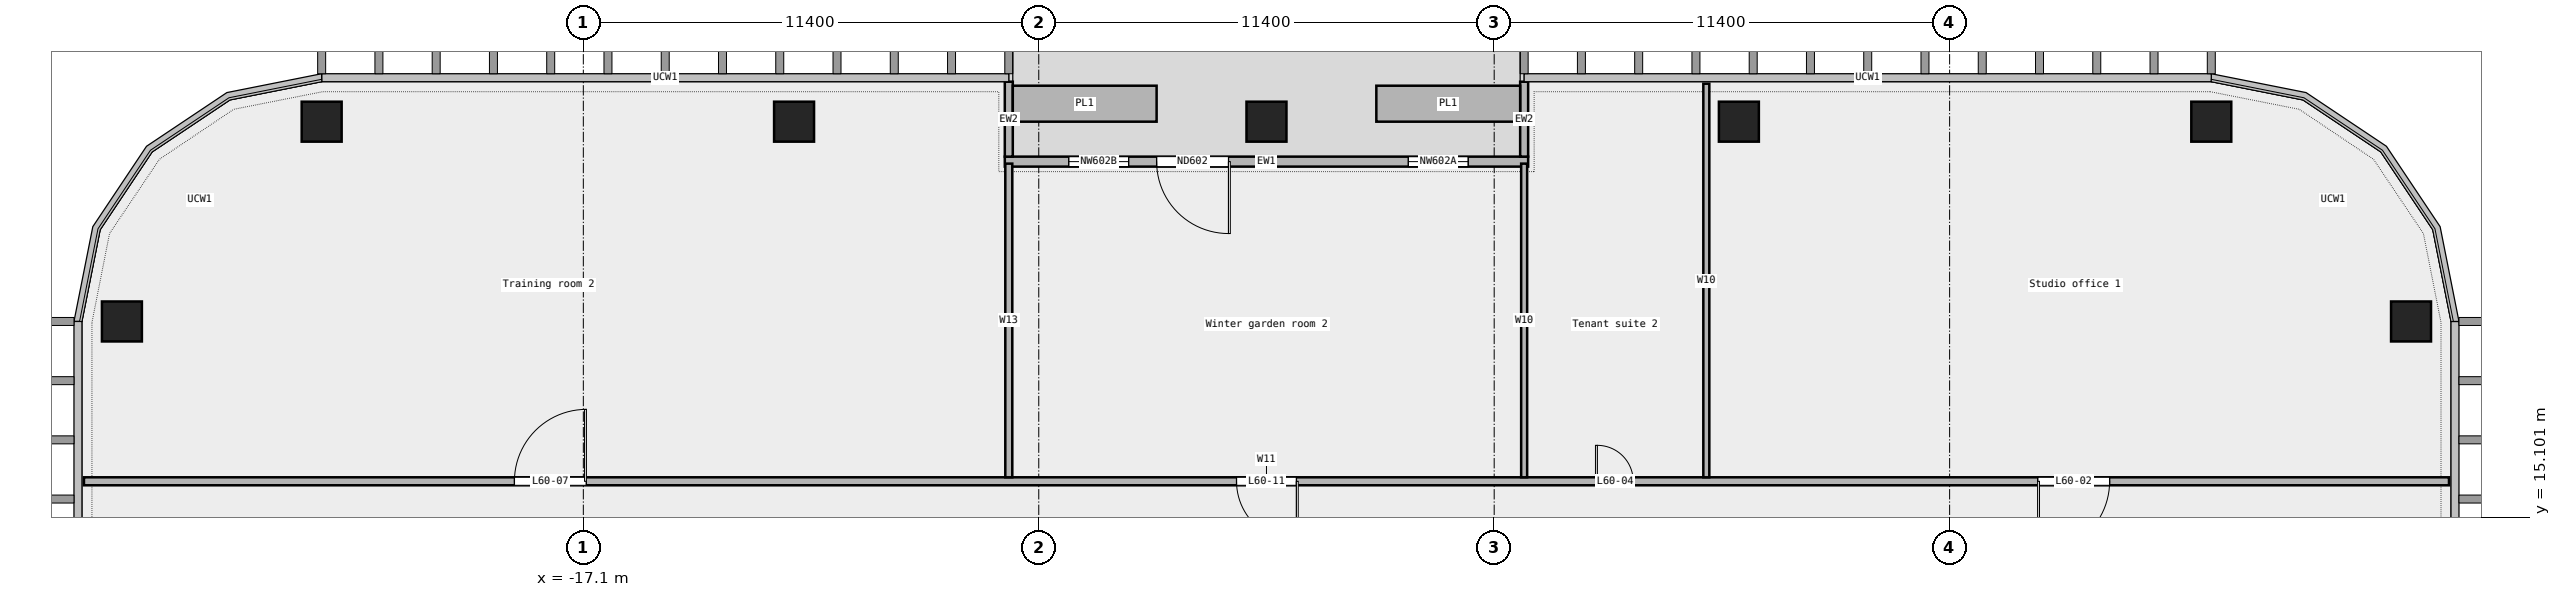
"""IFC4 building model, lengths in metres.
Left out: names, types, materials, properties, quantities, classifications, styles, units other than length and angle.
Written with IfcOpenShell. Run it as: python <this file> out.ifc"""

import sys

from ifc_helpers import new_model, si_unit, direction, frame, frame_2d, origin, origin_2d, place, context, subcontext, project, spatial, rectangle, extrude, element, fill, save


model = new_model("IFC4")
c1 = context("Model", 3, precision=1e-05, world=origin(), true_north=direction((0.0, 1.0)))
c2 = subcontext(c1, "Body", "Model", "MODEL_VIEW")
j1 = project(units=[si_unit("LENGTHUNIT", "METRE"), si_unit("PLANEANGLEUNIT", "RADIAN")], contexts=[c1])
p1 = place(None, origin())
s1 = spatial("IfcSite", under=j1, at=p1, CompositionType="ELEMENT")
p2 = place(p1, origin())
s2 = spatial("IfcBuilding", under=s1, at=p2, CompositionType="ELEMENT")
p3 = place(p2, frame((0.0, 0.0, 279.4)))
s3 = spatial("IfcBuildingStorey", under=s2, at=p3, CompositionType="ELEMENT", Elevation=279.4)
for number, where, z_axis, x_axis in (
    (1, (28.65, 20.0, 0.0), (0.0, 0.0, 1.0), (1.0, 0.0, 0.0)),
    (2, (23.65, 25.0, 0.0), (0.0, 0.0, 1.0), (1.0, 0.0, 0.0)),
    (3, (11.825, 25.0, 0.0), (0.0, 0.0, 1.0), (1.0, 0.0, 0.0)),
    (4, (0.0, 25.0, 0.0), (0.0, 0.0, 1.0), (1.0, 0.0, 0.0)),
    (5, (-11.825, 25.0, 0.0), (0.0, 0.0, 1.0), (1.0, 0.0, 0.0)),
    (6, (-23.65, 25.0, 0.0), (0.0, 0.0, 1.0), (1.0, 0.0, 0.0)),
    (7, (-28.65, 20.0, 0.0), (0.0, 0.0, 1.0), (1.0, 0.0, 0.0)),
):
    element("IfcColumn", number, at=place(p3, frame(where, z_axis=z_axis, x_axis=x_axis)), inside=s3, PredefinedType="COLUMN", context=c2, shape_type="SweptSolid", body=[
        extrude(rectangle(XDim=1.0, YDim=1.0, at=origin_2d()), origin(), (0.0, 0.0, 1.0), 3.6),
    ])
p4 = place(p3, frame((6.55, 24.0, 0.0), z_axis=(0.0, 0.0, 1.0), x_axis=(-1.0, 0.0, 0.0)))
e8 = element("IfcWall", 8, at=p4, inside=s3, PredefinedType="STANDARD", context=c2, shape_type="SweptSolid", body=[
    extrude(rectangle(XDim=13.1, YDim=0.25, at=frame_2d((6.55, 0.0))), origin(), (0.0, 0.0, 1.0), 3.6),
])
p5 = place(p4, frame((1.5, 0.0, 0.45)))
e9 = element("IfcOpeningElement", 9, at=p5, cuts=e8, PredefinedType="OPENING", context=c2, shape_type="SweptSolid", body=[
    extrude(rectangle(XDim=1.5, YDim=2.4, at=frame_2d((0.75, 1.2))), frame((0.0, 0.137, 0.0), z_axis=(0.0, -1.0, 0.0), x_axis=(1.0, 0.0, 0.0)), (0.0, 0.0, 1.0), 0.274),
])
p6 = place(p4, frame((7.5, 0.0, 0.0)))
e10 = element("IfcOpeningElement", 10, at=p6, cuts=e8, PredefinedType="OPENING", context=c2, shape_type="SweptSolid", body=[
    extrude(rectangle(XDim=1.8, YDim=2.4, at=frame_2d((0.9, 1.2))), frame((0.0, 0.137, 0.0), z_axis=(0.0, -1.0, 0.0), x_axis=(1.0, 0.0, 0.0)), (0.0, 0.0, 1.0), 0.274),
])
p7 = place(p4, frame((10.0, 0.0, 0.45)))
e11 = element("IfcOpeningElement", 11, at=p7, cuts=e8, PredefinedType="OPENING", context=c2, shape_type="SweptSolid", body=[
    extrude(rectangle(XDim=1.5, YDim=2.4, at=frame_2d((0.75, 1.2))), frame((0.0, 0.137, 0.0), z_axis=(0.0, -1.0, 0.0), x_axis=(1.0, 0.0, 0.0)), (0.0, 0.0, 1.0), 0.274),
])
for number, where, z_axis, x_axis in (
    (12, (6.45, 26.0, 0.0), (0.0, 0.0, 1.0), (0.0, -1.0, 0.0)),
    (13, (-6.45, 26.0, 0.0), (0.0, 0.0, 1.0), (0.0, -1.0, 0.0)),
):
    element("IfcWall", number, at=place(p3, frame(where, z_axis=z_axis, x_axis=x_axis)), inside=s3, PredefinedType="STANDARD", context=c2, shape_type="SweptSolid", body=[
        extrude(rectangle(XDim=1.875, YDim=0.2, at=frame_2d((0.938, 0.0))), origin(), (0.0, 0.0, 1.0), 3.6),
    ])
for number, where, z_axis, x_axis in (
    (14, (6.35, 25.45, 0.0), (0.0, 0.0, 1.0), (-1.0, 0.0, 0.0)),
    (15, (-2.75, 25.45, 0.0), (0.0, 0.0, 1.0), (-1.0, 0.0, 0.0)),
):
    element("IfcWall", number, at=place(p3, frame(where, z_axis=z_axis, x_axis=x_axis)), inside=s3, PredefinedType="STANDARD", context=c2, shape_type="SweptSolid", body=[
        extrude(rectangle(XDim=3.6, YDim=0.9, at=frame_2d((1.8, 0.0))), origin(), (0.0, 0.0, 1.0), 0.7),
    ])
p8 = place(p3, frame((-29.6, 16.0, 0.0), z_axis=(0.0, 0.0, 1.0), x_axis=(1.0, 0.0, 0.0)))
e16 = element("IfcWall", 16, at=p8, inside=s3, PredefinedType="PARTITIONING", context=c2, shape_type="SweptSolid", body=[
    extrude(rectangle(XDim=59.2, YDim=0.2, at=frame_2d((29.6, 0.0))), origin(), (0.0, 0.0, 1.0), 3.6),
])
p9 = place(p8, frame((48.905, 0.0, 0.0)))
e17 = element("IfcOpeningElement", 17, at=p9, cuts=e16, PredefinedType="OPENING", context=c2, shape_type="SweptSolid", body=[
    extrude(rectangle(XDim=1.8, YDim=2.1, at=frame_2d((0.9, 1.05))), frame((0.0, 0.112, 0.0), z_axis=(0.0, -1.0, 0.0), x_axis=(1.0, 0.0, 0.0)), (0.0, 0.0, 1.0), 0.224),
])
p10 = place(p8, frame((37.88, 0.0, 0.0)))
e18 = element("IfcOpeningElement", 18, at=p10, cuts=e16, PredefinedType="OPENING", context=c2, shape_type="SweptSolid", body=[
    extrude(rectangle(XDim=0.9, YDim=2.1, at=frame_2d((0.45, 1.05))), frame((0.0, 0.112, 0.0), z_axis=(0.0, -1.0, 0.0), x_axis=(1.0, 0.0, 0.0)), (0.0, 0.0, 1.0), 0.224),
])
p11 = place(p8, frame((10.775, 0.0, 0.0)))
e19 = element("IfcOpeningElement", 19, at=p11, cuts=e16, PredefinedType="OPENING", context=c2, shape_type="SweptSolid", body=[
    extrude(rectangle(XDim=1.8, YDim=2.1, at=frame_2d((0.9, 1.05))), frame((0.0, 0.112, 0.0), z_axis=(0.0, -1.0, 0.0), x_axis=(1.0, 0.0, 0.0)), (0.0, 0.0, 1.0), 0.224),
])
p12 = place(p8, frame((28.85, 0.0, 0.0)))
e20 = element("IfcOpeningElement", 20, at=p12, cuts=e16, PredefinedType="OPENING", context=c2, shape_type="SweptSolid", body=[
    extrude(rectangle(XDim=1.5, YDim=2.1, at=frame_2d((0.75, 1.05))), frame((0.0, 0.112, 0.0), z_axis=(0.0, -1.0, 0.0), x_axis=(1.0, 0.0, 0.0)), (0.0, 0.0, 1.0), 0.224),
])
p13 = place(p3, frame((-6.45, 16.1, 0.0), z_axis=(0.0, 0.0, 1.0), x_axis=(0.0, 1.0, 0.0)))
e21 = element("IfcWall", 21, at=p13, inside=s3, PredefinedType="PARTITIONING", context=c2, shape_type="SweptSolid", body=[
    extrude(rectangle(XDim=7.85, YDim=0.175, at=frame_2d((3.925, 0.0))), origin(), (0.0, 0.0, 1.0), 3.6),
])
p14 = place(p3, frame((6.45, 16.1, 0.0), z_axis=(0.0, 0.0, 1.0), x_axis=(0.0, 1.0, 0.0)))
e22 = element("IfcWall", 22, at=p14, inside=s3, PredefinedType="PARTITIONING", context=c2, shape_type="SweptSolid", body=[
    extrude(rectangle(XDim=7.85, YDim=0.15, at=frame_2d((3.925, 0.0))), origin(), (0.0, 0.0, 1.0), 3.6),
])
p15 = place(p3, frame((11.01, 16.1, 0.0), z_axis=(0.0, 0.0, 1.0), x_axis=(0.0, 1.0, 0.0)))
e23 = element("IfcWall", 23, at=p15, inside=s3, PredefinedType="PARTITIONING", context=c2, shape_type="SweptSolid", body=[
    extrude(rectangle(XDim=9.85, YDim=0.15, at=frame_2d((4.925, 0.0))), origin(), (0.0, 0.0, 1.0), 3.6),
])
p16 = place(p5, origin())
e24 = element("IfcWindow", 24, at=p16, inside=s3, PartitioningType="SINGLE_PANEL", PredefinedType="WINDOW", context=c2, shape_type="SweptSolid", body=[
    extrude(rectangle(XDim=1.5, YDim=2.4, at=frame_2d((0.75, 1.2))), frame((0.0, 0.03, 0.0), z_axis=(0.0, -1.0, 0.0), x_axis=(1.0, 0.0, 0.0)), (0.0, 0.0, 1.0), 0.06),
])
fill(e9, e24)
p17 = place(p6, origin())
e25 = element("IfcDoor", 25, at=p17, inside=s3, OperationType="DOUBLE_DOOR_SINGLE_SWING", PredefinedType="DOOR", context=c2, shape_type="SweptSolid", body=[
    extrude(rectangle(XDim=1.8, YDim=2.4, at=frame_2d((0.9, 1.2))), frame((0.0, 0.025, 0.0), z_axis=(0.0, -1.0, 0.0), x_axis=(1.0, 0.0, 0.0)), (0.0, 0.0, 1.0), 0.05),
])
fill(e10, e25)
p18 = place(p7, origin())
e26 = element("IfcWindow", 26, at=p18, inside=s3, PartitioningType="SINGLE_PANEL", PredefinedType="WINDOW", context=c2, shape_type="SweptSolid", body=[
    extrude(rectangle(XDim=1.5, YDim=2.4, at=frame_2d((0.75, 1.2))), frame((0.0, 0.03, 0.0), z_axis=(0.0, -1.0, 0.0), x_axis=(1.0, 0.0, 0.0)), (0.0, 0.0, 1.0), 0.06),
])
fill(e11, e26)
p19 = place(p9, origin())
e27 = element("IfcDoor", 27, at=p19, inside=s3, OperationType="DOUBLE_DOOR_SINGLE_SWING", PredefinedType="DOOR", context=c2, shape_type="SweptSolid", body=[
    extrude(rectangle(XDim=1.8, YDim=2.1, at=frame_2d((0.9, 1.05))), frame((0.0, 0.025, 0.0), z_axis=(0.0, -1.0, 0.0), x_axis=(1.0, 0.0, 0.0)), (0.0, 0.0, 1.0), 0.05),
])
fill(e17, e27)
p20 = place(p10, origin())
e28 = element("IfcDoor", 28, at=p20, inside=s3, OperationType="SINGLE_SWING_LEFT", PredefinedType="DOOR", context=c2, shape_type="SweptSolid", body=[
    extrude(rectangle(XDim=0.9, YDim=2.1, at=frame_2d((0.45, 1.05))), frame((0.0, 0.025, 0.0), z_axis=(0.0, -1.0, 0.0), x_axis=(1.0, 0.0, 0.0)), (0.0, 0.0, 1.0), 0.05),
])
fill(e18, e28)
p21 = place(p11, origin())
e29 = element("IfcDoor", 29, at=p21, inside=s3, OperationType="DOUBLE_DOOR_SINGLE_SWING", PredefinedType="DOOR", context=c2, shape_type="SweptSolid", body=[
    extrude(rectangle(XDim=1.8, YDim=2.1, at=frame_2d((0.9, 1.05))), frame((0.0, 0.025, 0.0), z_axis=(0.0, -1.0, 0.0), x_axis=(1.0, 0.0, 0.0)), (0.0, 0.0, 1.0), 0.05),
])
fill(e19, e29)
p22 = place(p12, origin())
e30 = element("IfcDoor", 30, at=p22, inside=s3, OperationType="DOUBLE_DOOR_SINGLE_SWING", PredefinedType="DOOR", context=c2, shape_type="SweptSolid", body=[
    extrude(rectangle(XDim=1.5, YDim=2.1, at=frame_2d((0.75, 1.05))), frame((0.0, 0.025, 0.0), z_axis=(0.0, -1.0, 0.0), x_axis=(1.0, 0.0, 0.0)), (0.0, 0.0, 1.0), 0.05),
])
fill(e20, e30)
save(model, sys.argv[1])
